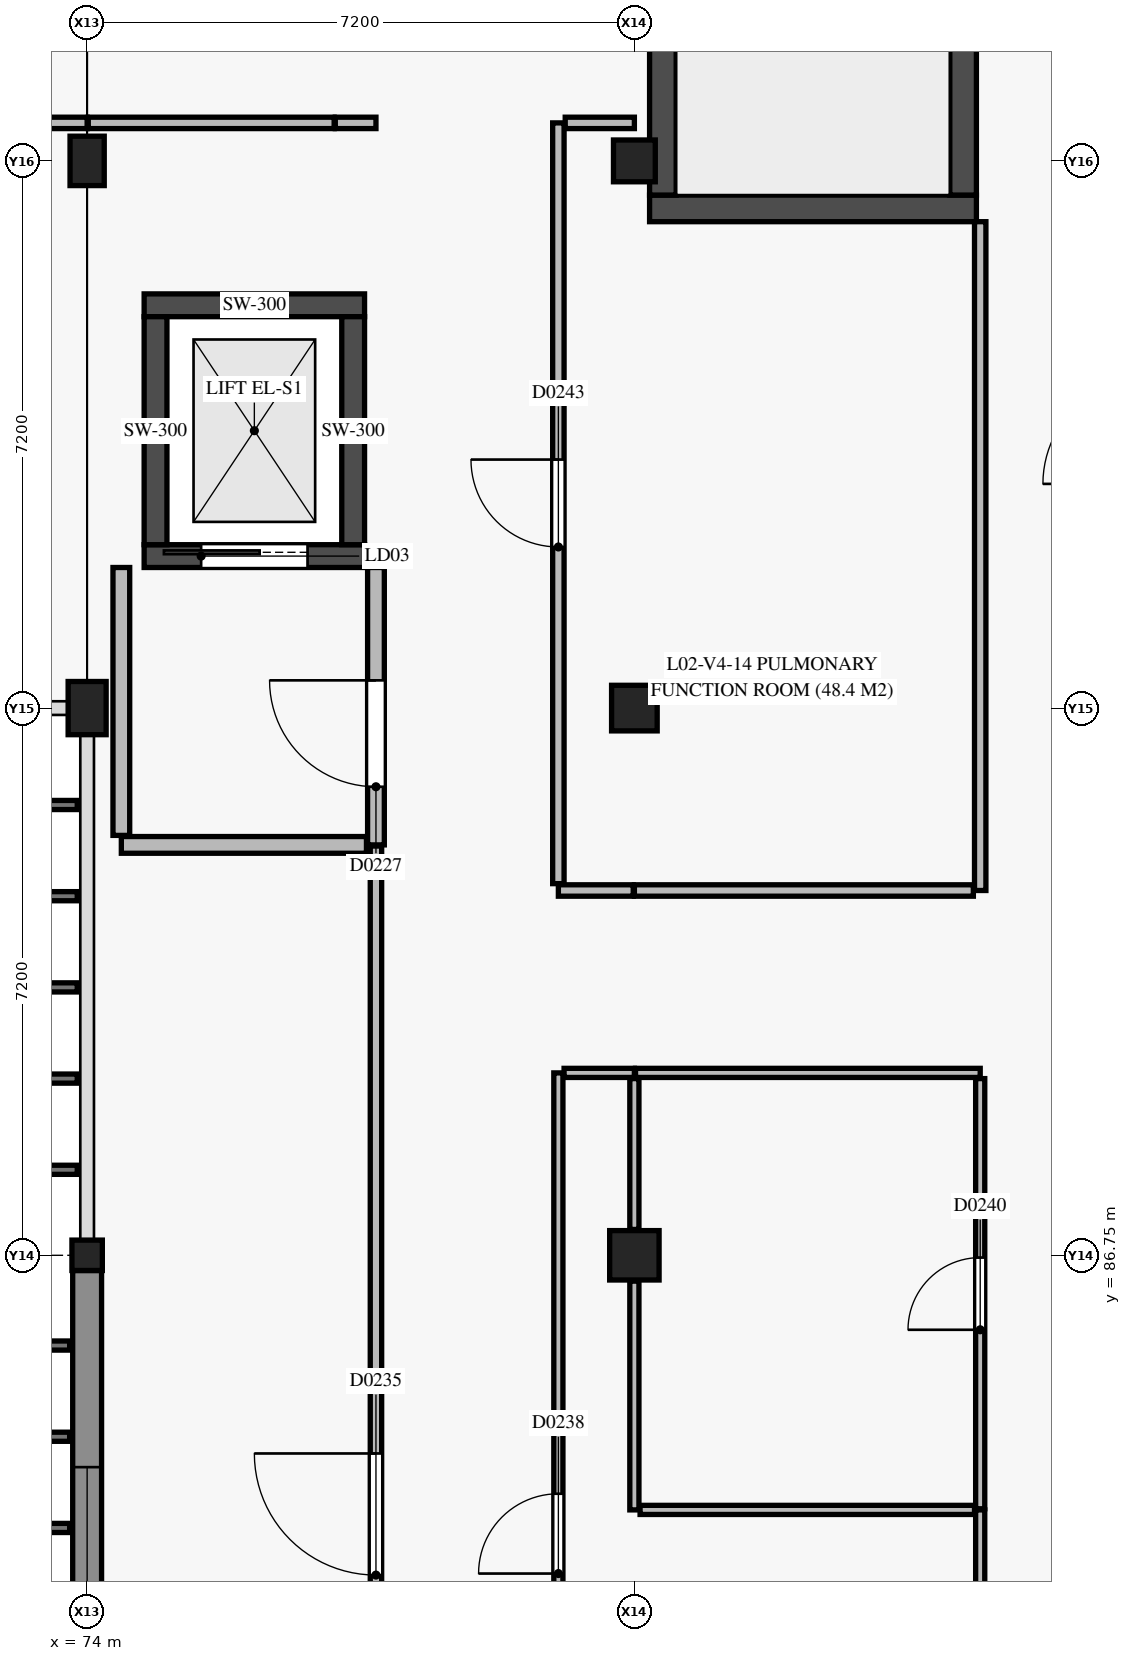
"""IFC4 building model, lengths in metres.
Left out: names, types, materials, properties, quantities, classifications, styles, units other than length and angle.
Written with IfcOpenShell. Run it as: python <this file> out.ifc"""

import sys

from ifc_helpers import new_model, si_unit, direction, frame, frame_2d, origin, origin_2d, place, context, subcontext, project, spatial, rectangle, extrude, element, fill, save


model = new_model("IFC4")
c1 = context("Model", 3, precision=1e-05, world=origin(), true_north=direction((0.0, 1.0)))
c2 = subcontext(c1, "Body", "Model", "MODEL_VIEW")
j1 = project(units=[si_unit("LENGTHUNIT", "METRE"), si_unit("PLANEANGLEUNIT", "RADIAN")], contexts=[c1])
p1 = place(None, origin())
s1 = spatial("IfcSite", under=j1, at=p1, CompositionType="ELEMENT")
p2 = place(p1, origin())
s2 = spatial("IfcBuilding", under=s1, at=p2, CompositionType="ELEMENT")
p3 = place(p2, frame((0.0, 0.0, 9.0)))
s3 = spatial("IfcBuildingStorey", under=s2, at=p3, CompositionType="ELEMENT", Elevation=9.0)
p4 = place(p3, frame((74.0, 86.75, 0.0), z_axis=(0.0, 0.0, 1.0), x_axis=(1.0, 0.0, 0.0)))
e1 = element("IfcColumn", 1, at=p4, inside=s3, PredefinedType="COLUMN", context=c2, shape_type="SweptSolid", body=[
    extrude(rectangle(XDim=0.4, YDim=0.4, at=origin_2d()), origin(), (0.0, 0.0, 1.0), 4.2),
])
p5 = place(p3, frame((74.0, 93.95, 0.0), z_axis=(0.0, 0.0, 1.0), x_axis=(1.0, 0.0, 0.0)))
e2 = element("IfcColumn", 2, at=p5, inside=s3, PredefinedType="COLUMN", context=c2, shape_type="SweptSolid", body=[
    extrude(rectangle(XDim=0.5, YDim=0.7, at=origin_2d()), origin(), (0.0, 0.0, 1.0), 4.2),
])
p6 = place(p3, frame((74.0, 101.15, 0.0), z_axis=(0.0, 0.0, 1.0), x_axis=(1.0, 0.0, 0.0)))
e3 = element("IfcColumn", 3, at=p6, inside=s3, PredefinedType="COLUMN", context=c2, shape_type="SweptSolid", body=[
    extrude(rectangle(XDim=0.45, YDim=0.65, at=origin_2d()), origin(), (0.0, 0.0, 1.0), 4.2),
])
p7 = place(p3, frame((81.2, 86.75, 0.0), z_axis=(0.0, 0.0, 1.0), x_axis=(1.0, 0.0, 0.0)))
e4 = element("IfcColumn", 4, at=p7, inside=s3, PredefinedType="COLUMN", context=c2, shape_type="SweptSolid", body=[
    extrude(rectangle(XDim=0.65, YDim=0.65, at=origin_2d()), origin(), (0.0, 0.0, 1.0), 4.2),
])
p8 = place(p3, frame((81.2, 93.95, 0.0), z_axis=(0.0, 0.0, 1.0), x_axis=(1.0, 0.0, 0.0)))
e5 = element("IfcColumn", 5, at=p8, inside=s3, PredefinedType="COLUMN", context=c2, shape_type="SweptSolid", body=[
    extrude(rectangle(XDim=0.6, YDim=0.6, at=origin_2d()), origin(), (0.0, 0.0, 1.0), 4.2),
])
p9 = place(p3, frame((81.2, 101.15, 0.0), z_axis=(0.0, 0.0, 1.0), x_axis=(1.0, 0.0, 0.0)))
e6 = element("IfcColumn", 6, at=p9, inside=s3, PredefinedType="COLUMN", context=c2, shape_type="SweptSolid", body=[
    extrude(rectangle(XDim=0.55, YDim=0.55, at=origin_2d()), origin(), (0.0, 0.0, 1.0), 4.2),
])
p10 = place(p3, frame((81.4, 100.525, 0.0), z_axis=(0.0, 0.0, 1.0), x_axis=(1.0, 0.0, 0.0)))
e7 = element("IfcWall", 7, at=p10, inside=s3, PredefinedType="SHEAR", context=c2, shape_type="SweptSolid", body=[
    extrude(rectangle(XDim=4.3, YDim=0.35, at=frame_2d((2.15, 0.0))), origin(), (0.0, 0.0, 1.0), 3.95),
])
p11 = place(p3, frame((81.575, 100.7, 0.0), z_axis=(0.0, 0.0, 1.0), x_axis=(0.0, 1.0, 0.0)))
e8 = element("IfcWall", 8, at=p11, inside=s3, PredefinedType="SHEAR", context=c2, shape_type="SweptSolid", body=[
    extrude(rectangle(XDim=7.3, YDim=0.35, at=frame_2d((3.65, 0.0))), origin(), (0.0, 0.0, 1.0), 3.95),
])
p12 = place(p3, frame((85.525, 100.7, 0.0), z_axis=(0.0, 0.0, 1.0), x_axis=(0.0, 1.0, 0.0)))
e9 = element("IfcWall", 9, at=p12, inside=s3, PredefinedType="SHEAR", context=c2, shape_type="SweptSolid", body=[
    extrude(rectangle(XDim=7.3, YDim=0.35, at=frame_2d((3.65, 0.0))), origin(), (0.0, 0.0, 1.0), 3.95),
])
p13 = place(p12, frame((5.68, 0.0, 0.0)))
e10 = element("IfcOpeningElement", 10, at=p13, cuts=e9, PredefinedType="OPENING", context=c2, shape_type="SweptSolid", body=[
    extrude(rectangle(XDim=1.5, YDim=2.15, at=frame_2d((0.75, 1.075))), frame((0.0, 0.185, 0.0), z_axis=(0.0, -1.0, 0.0), x_axis=(1.0, 0.0, 0.0)), (0.0, 0.0, 1.0), 0.37),
])
p14 = place(p3, frame((74.75, 95.95, 0.0), z_axis=(0.0, 0.0, 1.0), x_axis=(1.0, 0.0, 0.0)))
e11 = element("IfcWall", 11, at=p14, inside=s3, PredefinedType="SHEAR", context=c2, shape_type="SweptSolid", body=[
    extrude(rectangle(XDim=2.9, YDim=0.3, at=frame_2d((1.45, 0.0))), origin(), (0.0, 0.0, 1.0), 3.95),
])
p15 = place(p14, frame((0.75, 0.0, 0.0)))
e12 = element("IfcOpeningElement", 12, at=p15, cuts=e11, PredefinedType="OPENING", context=c2, shape_type="SweptSolid", body=[
    extrude(rectangle(XDim=1.4, YDim=2.15, at=frame_2d((0.7, 1.075))), frame((0.0, 0.16, 0.0), z_axis=(0.0, -1.0, 0.0), x_axis=(1.0, 0.0, 0.0)), (0.0, 0.0, 1.0), 0.32),
])
p16 = place(p3, frame((74.75, 99.25, 0.0), z_axis=(0.0, 0.0, 1.0), x_axis=(1.0, 0.0, 0.0)))
e13 = element("IfcWall", 13, at=p16, inside=s3, PredefinedType="SHEAR", context=c2, shape_type="SweptSolid", body=[
    extrude(rectangle(XDim=2.9, YDim=0.3, at=frame_2d((1.45, 0.0))), origin(), (0.0, 0.0, 1.0), 3.95),
])
for number, where, z_axis, x_axis in (
    (14, (74.9, 96.1, 0.0), (0.0, 0.0, 1.0), (0.0, 1.0, 0.0)),
    (15, (77.5, 96.1, 0.0), (0.0, 0.0, 1.0), (0.0, 1.0, 0.0)),
):
    element("IfcWall", number, at=place(p3, frame(where, z_axis=z_axis, x_axis=x_axis)), inside=s3, PredefinedType="SHEAR", context=c2, shape_type="SweptSolid", body=[
        extrude(rectangle(XDim=3.0, YDim=0.3, at=frame_2d((1.5, 0.0))), origin(), (0.0, 0.0, 1.0), 3.95),
    ])
p17 = place(p3, frame((74.0, 79.775, 0.0), z_axis=(0.0, 0.0, 1.0), x_axis=(0.0, 1.0, 0.0)))
e16 = element("IfcWall", 16, at=p17, inside=s3, PredefinedType="USERDEFINED", context=c2, shape_type="SweptSolid", body=[
    extrude(rectangle(XDim=6.775, YDim=0.38, at=frame_2d((3.388, 0.0))), origin(), (0.0, 0.0, 1.0), 3.13),
])
p18 = place(p17, frame((2.587, 0.0, 0.6)))
e17 = element("IfcOpeningElement", 17, at=p18, cuts=e16, PredefinedType="OPENING", context=c2, shape_type="SweptSolid", body=[
    extrude(rectangle(XDim=1.6, YDim=2.2, at=frame_2d((0.8, 1.1))), frame((0.0, 0.2, 0.0), z_axis=(0.0, -1.0, 0.0), x_axis=(1.0, 0.0, 0.0)), (0.0, 0.0, 1.0), 0.4),
])
p19 = place(p3, frame((77.8, 92.15, 0.0), z_axis=(0.0, 0.0, 1.0), x_axis=(0.0, 1.0, 0.0)))
e18 = element("IfcWall", 18, at=p19, inside=s3, PredefinedType="PARTITIONING", context=c2, shape_type="SweptSolid", body=[
    extrude(rectangle(XDim=3.65, YDim=0.22, at=frame_2d((1.825, 0.0))), origin(), (0.0, 0.0, 1.0), 3.415),
])
p20 = place(p19, frame((0.765, 0.0, 0.0)))
e19 = element("IfcOpeningElement", 19, at=p20, cuts=e18, PredefinedType="OPENING", context=c2, shape_type="SweptSolid", body=[
    extrude(rectangle(XDim=1.4, YDim=2.2, at=frame_2d((0.7, 1.1))), frame((0.0, 0.12, 0.0), z_axis=(0.0, -1.0, 0.0), x_axis=(1.0, 0.0, 0.0)), (0.0, 0.0, 1.0), 0.24),
])
p21 = place(p3, frame((74.45, 92.15, 0.0), z_axis=(0.0, 0.0, 1.0), x_axis=(1.0, 0.0, 0.0)))
e20 = element("IfcWall", 20, at=p21, inside=s3, PredefinedType="PARTITIONING", context=c2, shape_type="SweptSolid", body=[
    extrude(rectangle(XDim=3.225, YDim=0.22, at=frame_2d((1.613, 0.0))), origin(), (0.0, 0.0, 1.0), 3.95),
])
p22 = place(p3, frame((74.45, 92.275, 0.0), z_axis=(0.0, 0.0, 1.0), x_axis=(0.0, 1.0, 0.0)))
e21 = element("IfcWall", 21, at=p22, inside=s3, PredefinedType="PARTITIONING", context=c2, shape_type="SweptSolid", body=[
    extrude(rectangle(XDim=3.525, YDim=0.22, at=frame_2d((1.763, 0.0))), origin(), (0.0, 0.0, 1.0), 3.415),
])
p23 = place(p3, frame((70.52, 101.65, 0.0), z_axis=(0.0, 0.0, 1.0), x_axis=(1.0, 0.0, 0.0)))
e22 = element("IfcWall", 22, at=p23, inside=s3, PredefinedType="PARTITIONING", context=c2, shape_type="SweptSolid", body=[
    extrude(rectangle(XDim=3.48, YDim=0.15, at=frame_2d((1.74, 0.0))), origin(), (0.0, 0.0, 1.0), 3.135),
])
p24 = place(p3, frame((74.015, 101.65, 0.0), z_axis=(0.0, 0.0, 1.0), x_axis=(1.0, 0.0, 0.0)))
e23 = element("IfcWall", 23, at=p24, inside=s3, PredefinedType="PARTITIONING", context=c2, shape_type="SweptSolid", body=[
    extrude(rectangle(XDim=3.235, YDim=0.15, at=frame_2d((1.618, 0.0))), origin(), (0.0, 0.0, 1.0), 3.135),
])
p25 = place(p3, frame((77.265, 101.65, 0.0), z_axis=(0.0, 0.0, 1.0), x_axis=(1.0, 0.0, 0.0)))
e24 = element("IfcWall", 24, at=p25, inside=s3, PredefinedType="PARTITIONING", context=c2, shape_type="SweptSolid", body=[
    extrude(rectangle(XDim=0.535, YDim=0.15, at=frame_2d((0.268, 0.0))), origin(), (0.0, 0.0, 1.0), 3.95),
])
p26 = place(p3, frame((77.8, 74.55, 0.0), z_axis=(0.0, 0.0, 1.0), x_axis=(0.0, 1.0, 0.0)))
e25 = element("IfcWall", 25, at=p26, inside=s3, PredefinedType="PARTITIONING", context=c2, shape_type="SweptSolid", body=[
    extrude(rectangle(XDim=17.585, YDim=0.15, at=frame_2d((8.792, 0.0))), origin(), (0.0, 0.0, 1.0), 2.375),
])
p27 = place(p26, frame((7.992, 0.0, 0.0)))
e26 = element("IfcOpeningElement", 26, at=p27, cuts=e25, PredefinedType="OPENING", context=c2, shape_type="SweptSolid", body=[
    extrude(rectangle(XDim=1.6, YDim=2.25, at=frame_2d((0.8, 1.125))), frame((0.0, 0.085, 0.0), z_axis=(0.0, -1.0, 0.0), x_axis=(1.0, 0.0, 0.0)), (0.0, 0.0, 1.0), 0.17),
])
p28 = place(p3, frame((85.75, 91.55, 0.0), z_axis=(0.0, 0.0, 1.0), x_axis=(0.0, 1.0, 0.0)))
e27 = element("IfcWall", 27, at=p28, inside=s3, PredefinedType="PARTITIONING", context=c2, shape_type="SweptSolid", body=[
    extrude(rectangle(XDim=8.8, YDim=0.15, at=frame_2d((4.4, 0.0))), origin(), (0.0, 0.0, 1.0), 3.455),
])
p29 = place(p3, frame((81.2, 91.55, 0.0), z_axis=(0.0, 0.0, 1.0), x_axis=(1.0, 0.0, 0.0)))
e28 = element("IfcWall", 28, at=p29, inside=s3, PredefinedType="PARTITIONING", context=c2, shape_type="SweptSolid", body=[
    extrude(rectangle(XDim=4.46, YDim=0.15, at=frame_2d((2.23, 0.0))), origin(), (0.0, 0.0, 1.0), 3.215),
])
p30 = place(p3, frame((80.2, 91.55, 0.0), z_axis=(0.0, 0.0, 1.0), x_axis=(1.0, 0.0, 0.0)))
e29 = element("IfcWall", 29, at=p30, inside=s3, PredefinedType="PARTITIONING", context=c2, shape_type="SweptSolid", body=[
    extrude(rectangle(XDim=0.985, YDim=0.15, at=frame_2d((0.493, 0.0))), origin(), (0.0, 0.0, 1.0), 3.215),
])
p31 = place(p3, frame((80.2, 91.64, 0.0), z_axis=(0.0, 0.0, 1.0), x_axis=(0.0, 1.0, 0.0)))
e30 = element("IfcWall", 30, at=p31, inside=s3, PredefinedType="PARTITIONING", context=c2, shape_type="SweptSolid", body=[
    extrude(rectangle(XDim=10.01, YDim=0.15, at=frame_2d((5.005, 0.0))), origin(), (0.0, 0.0, 1.0), 3.285),
])
p32 = place(p31, frame((4.43, 0.0, 0.0)))
e31 = element("IfcOpeningElement", 31, at=p32, cuts=e30, PredefinedType="OPENING", context=c2, shape_type="SweptSolid", body=[
    extrude(rectangle(XDim=1.15, YDim=2.15, at=frame_2d((0.575, 1.075))), frame((0.0, 0.085, 0.0), z_axis=(0.0, -1.0, 0.0), x_axis=(1.0, 0.0, 0.0)), (0.0, 0.0, 1.0), 0.17),
])
p33 = place(p3, frame((80.29, 101.65, 0.0), z_axis=(0.0, 0.0, 1.0), x_axis=(1.0, 0.0, 0.0)))
e32 = element("IfcWall", 32, at=p33, inside=s3, PredefinedType="PARTITIONING", context=c2, shape_type="SweptSolid", body=[
    extrude(rectangle(XDim=0.91, YDim=0.15, at=frame_2d((0.455, 0.0))), origin(), (0.0, 0.0, 1.0), 3.285),
])
p34 = place(p3, frame((85.75, 76.95, 0.0), z_axis=(0.0, 0.0, 1.0), x_axis=(0.0, 1.0, 0.0)))
e33 = element("IfcWall", 33, at=p34, inside=s3, PredefinedType="PARTITIONING", context=c2, shape_type="SweptSolid", body=[
    extrude(rectangle(XDim=6.45, YDim=0.12, at=frame_2d((3.225, 0.0))), origin(), (0.0, 0.0, 1.0), 3.355),
])
p35 = place(p3, frame((80.2, 77.025, 0.0), z_axis=(0.0, 0.0, 1.0), x_axis=(0.0, 1.0, 0.0)))
e34 = element("IfcWall", 34, at=p35, inside=s3, PredefinedType="PARTITIONING", context=c2, shape_type="SweptSolid", body=[
    extrude(rectangle(XDim=12.125, YDim=0.12, at=frame_2d((6.062, 0.0))), origin(), (0.0, 0.0, 1.0), 2.375),
])
p36 = place(p35, frame((5.538, 0.0, 0.0)))
e35 = element("IfcOpeningElement", 35, at=p36, cuts=e34, PredefinedType="OPENING", context=c2, shape_type="SweptSolid", body=[
    extrude(rectangle(XDim=1.05, YDim=2.15, at=frame_2d((0.525, 1.075))), frame((0.0, 0.07, 0.0), z_axis=(0.0, -1.0, 0.0), x_axis=(1.0, 0.0, 0.0)), (0.0, 0.0, 1.0), 0.14),
])
p37 = place(p3, frame((80.275, 89.15, 0.0), z_axis=(0.0, 0.0, 1.0), x_axis=(1.0, 0.0, 0.0)))
e36 = element("IfcWall", 36, at=p37, inside=s3, PredefinedType="PARTITIONING", context=c2, shape_type="SweptSolid", body=[
    extrude(rectangle(XDim=0.925, YDim=0.12, at=frame_2d((0.462, 0.0))), origin(), (0.0, 0.0, 1.0), 3.215),
])
p38 = place(p3, frame((81.215, 89.15, 0.0), z_axis=(0.0, 0.0, 1.0), x_axis=(1.0, 0.0, 0.0)))
e37 = element("IfcWall", 37, at=p38, inside=s3, PredefinedType="PARTITIONING", context=c2, shape_type="SweptSolid", body=[
    extrude(rectangle(XDim=4.535, YDim=0.12, at=frame_2d((2.268, 0.0))), origin(), (0.0, 0.0, 1.0), 3.215),
])
p39 = place(p3, frame((85.75, 83.415, 0.0), z_axis=(0.0, 0.0, 1.0), x_axis=(0.0, 1.0, 0.0)))
e38 = element("IfcWall", 38, at=p39, inside=s3, PredefinedType="PARTITIONING", context=c2, shape_type="SweptSolid", body=[
    extrude(rectangle(XDim=5.66, YDim=0.12, at=frame_2d((2.83, 0.0))), origin(), (0.0, 0.0, 1.0), 3.235),
])
p40 = place(p39, frame((2.355, 0.0, 0.0)))
e39 = element("IfcOpeningElement", 39, at=p40, cuts=e38, PredefinedType="OPENING", context=c2, shape_type="SweptSolid", body=[
    extrude(rectangle(XDim=0.95, YDim=2.1, at=frame_2d((0.475, 1.05))), frame((0.0, 0.07, 0.0), z_axis=(0.0, -1.0, 0.0), x_axis=(1.0, 0.0, 0.0)), (0.0, 0.0, 1.0), 0.14),
])
p41 = place(p3, frame((81.2, 83.4, 0.0), z_axis=(0.0, 0.0, 1.0), x_axis=(0.0, 1.0, 0.0)))
e40 = element("IfcWall", 40, at=p41, inside=s3, PredefinedType="PARTITIONING", context=c2, shape_type="SweptSolid", body=[
    extrude(rectangle(XDim=3.01, YDim=0.12, at=frame_2d((1.505, 0.0))), origin(), (0.0, 0.0, 1.0), 3.455),
])
p42 = place(p3, frame((81.2, 87.09, 0.0), z_axis=(0.0, 0.0, 1.0), x_axis=(0.0, 1.0, 0.0)))
e41 = element("IfcWall", 41, at=p42, inside=s3, PredefinedType="PARTITIONING", context=c2, shape_type="SweptSolid", body=[
    extrude(rectangle(XDim=1.985, YDim=0.12, at=frame_2d((0.992, 0.0))), origin(), (0.0, 0.0, 1.0), 3.215),
])
p43 = place(p3, frame((81.275, 83.4, 0.0), z_axis=(0.0, 0.0, 1.0), x_axis=(1.0, 0.0, 0.0)))
e42 = element("IfcWall", 42, at=p43, inside=s3, PredefinedType="PARTITIONING", context=c2, shape_type="SweptSolid", body=[
    extrude(rectangle(XDim=4.4, YDim=0.12, at=frame_2d((2.2, 0.0))), origin(), (0.0, 0.0, 1.0), 3.95),
])
p44 = place(p18, origin())
e43 = element("IfcWindow", 43, at=p44, inside=s3, PartitioningType="SINGLE_PANEL", PredefinedType="WINDOW", context=c2, shape_type="SweptSolid", body=[
    extrude(rectangle(XDim=1.6, YDim=2.2, at=frame_2d((0.8, 1.1))), frame((0.0, 0.03, 0.0), z_axis=(0.0, -1.0, 0.0), x_axis=(1.0, 0.0, 0.0)), (0.0, 0.0, 1.0), 0.06),
])
fill(e17, e43)
p45 = place(p15, origin())
e44 = element("IfcDoor", 44, at=p45, inside=s3, OperationType="SLIDING_TO_LEFT", PredefinedType="DOOR", context=c2, shape_type="SweptSolid", body=[
    extrude(rectangle(XDim=1.4, YDim=2.15, at=frame_2d((0.7, 1.075))), frame((0.0, 0.025, 0.0), z_axis=(0.0, -1.0, 0.0), x_axis=(1.0, 0.0, 0.0)), (0.0, 0.0, 1.0), 0.05),
])
fill(e12, e44)
p46 = place(p20, origin())
e45 = element("IfcDoor", 45, at=p46, inside=s3, OperationType="SINGLE_SWING_RIGHT", PredefinedType="DOOR", context=c2, shape_type="SweptSolid", body=[
    extrude(rectangle(XDim=1.4, YDim=2.2, at=frame_2d((0.7, 1.1))), frame((0.0, 0.025, 0.0), z_axis=(0.0, -1.0, 0.0), x_axis=(1.0, 0.0, 0.0)), (0.0, 0.0, 1.0), 0.05),
])
fill(e19, e45)
p47 = place(p27, origin())
e46 = element("IfcDoor", 46, at=p47, inside=s3, OperationType="SINGLE_SWING_RIGHT", PredefinedType="DOOR", context=c2, shape_type="SweptSolid", body=[
    extrude(rectangle(XDim=1.6, YDim=2.25, at=frame_2d((0.8, 1.125))), frame((0.0, 0.025, 0.0), z_axis=(0.0, -1.0, 0.0), x_axis=(1.0, 0.0, 0.0)), (0.0, 0.0, 1.0), 0.05),
])
fill(e26, e46)
p48 = place(p36, origin())
e47 = element("IfcDoor", 47, at=p48, inside=s3, OperationType="SINGLE_SWING_LEFT", PredefinedType="DOOR", context=c2, shape_type="SweptSolid", body=[
    extrude(rectangle(XDim=1.05, YDim=2.15, at=frame_2d((0.525, 1.075))), frame((0.0, 0.025, 0.0), z_axis=(0.0, -1.0, 0.0), x_axis=(1.0, 0.0, 0.0)), (0.0, 0.0, 1.0), 0.05),
])
fill(e35, e47)
p49 = place(p40, origin())
e48 = element("IfcDoor", 48, at=p49, inside=s3, OperationType="SINGLE_SWING_LEFT", PredefinedType="DOOR", context=c2, shape_type="SweptSolid", body=[
    extrude(rectangle(XDim=0.95, YDim=2.1, at=frame_2d((0.475, 1.05))), frame((0.0, 0.025, 0.0), z_axis=(0.0, -1.0, 0.0), x_axis=(1.0, 0.0, 0.0)), (0.0, 0.0, 1.0), 0.05),
])
fill(e39, e48)
p50 = place(p32, origin())
e49 = element("IfcDoor", 49, at=p50, inside=s3, OperationType="SINGLE_SWING_RIGHT", PredefinedType="DOOR", context=c2, shape_type="SweptSolid", body=[
    extrude(rectangle(XDim=1.15, YDim=2.15, at=frame_2d((0.575, 1.075))), frame((0.0, 0.025, 0.0), z_axis=(0.0, -1.0, 0.0), x_axis=(1.0, 0.0, 0.0)), (0.0, 0.0, 1.0), 0.05),
])
fill(e31, e49)
save(model, sys.argv[1])
